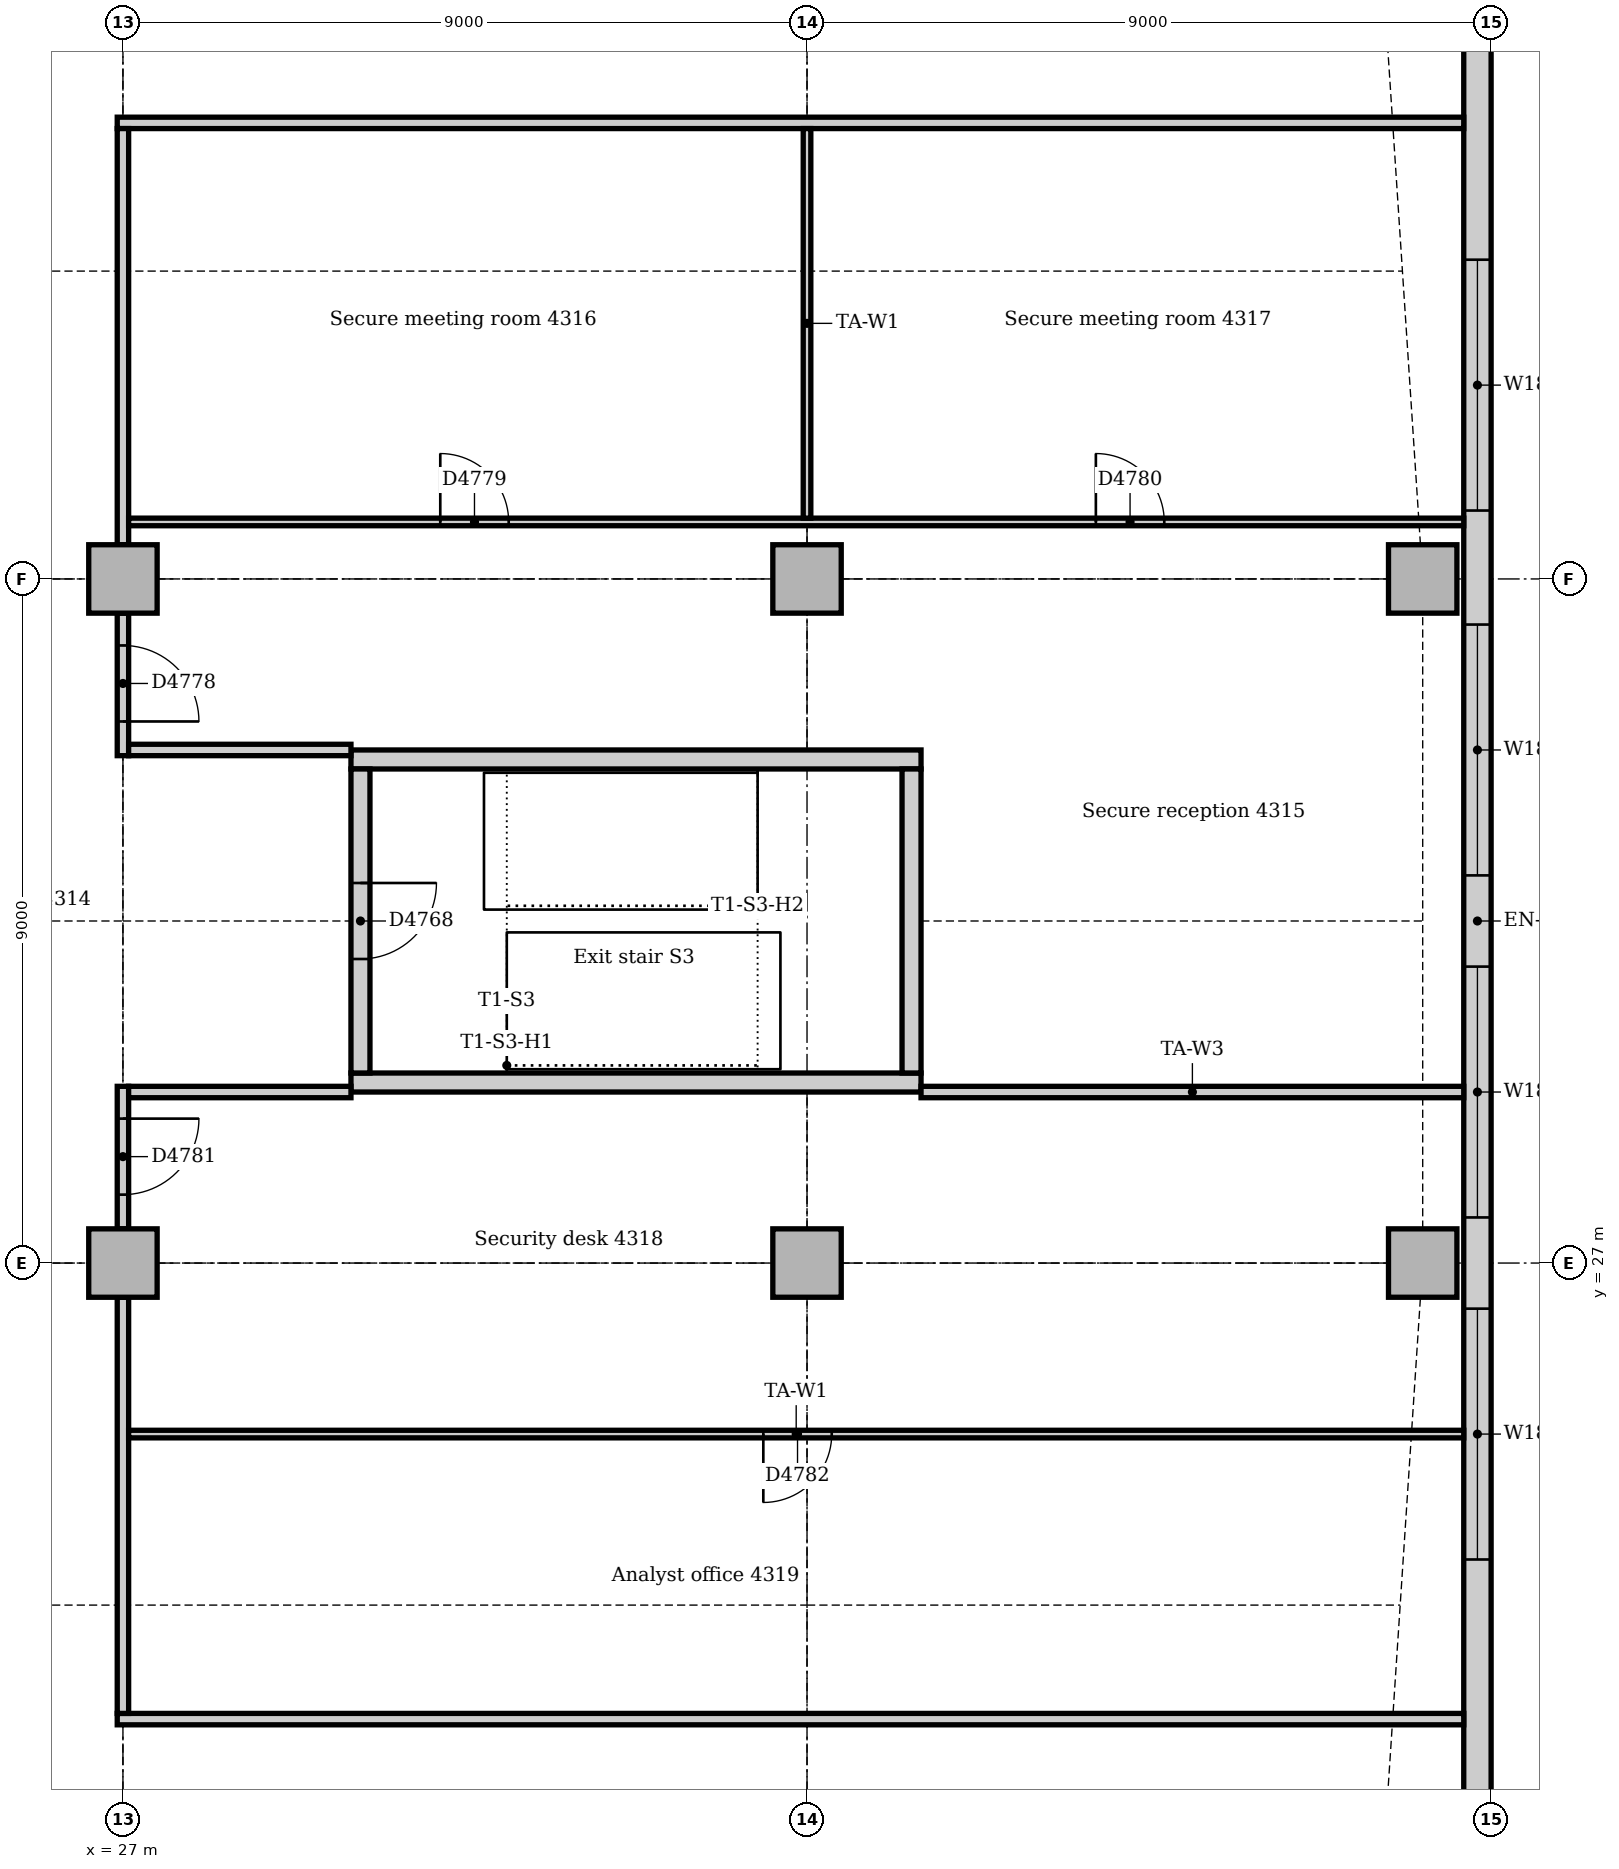
"""IFC4 building model, lengths in metres.
Left out: names, types, materials, properties, quantities, classifications, styles, units other than length and angle.
Written with IfcOpenShell. Run it as: python <this file> out.ifc"""

import sys

from ifc_helpers import new_model, si_unit, direction, frame, frame_2d, origin, origin_2d, place, context, subcontext, project, spatial, rectangle, extrude, element, fill, save


model = new_model("IFC4")
c1 = context("Model", 3, precision=1e-05, world=origin(), true_north=direction((0.0, 1.0)))
c2 = subcontext(c1, "Body", "Model", "MODEL_VIEW")
j1 = project(units=[si_unit("LENGTHUNIT", "METRE"), si_unit("PLANEANGLEUNIT", "RADIAN")], contexts=[c1])
p1 = place(None, origin())
s1 = spatial("IfcSite", under=j1, at=p1, CompositionType="ELEMENT")
p2 = place(p1, origin())
s2 = spatial("IfcBuilding", under=s1, at=p2, CompositionType="ELEMENT")
p3 = place(p2, frame((0.0, 0.0, 181.0)))
s3 = spatial("IfcBuildingStorey", under=s2, at=p3, CompositionType="ELEMENT", Elevation=181.0)
for number, where, z_axis, x_axis in (
    (1, (30.0, 29.375, 0.0), (0.0, 0.0, 1.0), (1.0, 0.0, 0.0)),
    (2, (37.5, 33.625, 0.0), (0.0, 0.0, 1.0), (-1.0, 0.0, 0.0)),
):
    element("IfcWall", number, at=place(p3, frame(where, z_axis=z_axis, x_axis=x_axis)), inside=s3, PredefinedType="SOLIDWALL", context=c2, shape_type="SweptSolid", body=[
        extrude(rectangle(XDim=7.5, YDim=0.25, at=frame_2d((3.75, 0.0))), origin(), (0.0, 0.0, 1.0), 4.0),
    ])
p4 = place(p3, frame((37.375, 29.5, 0.0), z_axis=(0.0, 0.0, 1.0), x_axis=(0.0, 1.0, 0.0)))
e3 = element("IfcWall", 3, at=p4, inside=s3, PredefinedType="SOLIDWALL", context=c2, shape_type="SweptSolid", body=[
    extrude(rectangle(XDim=4.0, YDim=0.25, at=frame_2d((2.0, 0.0))), origin(), (0.0, 0.0, 1.0), 4.0),
])
p5 = place(p3, frame((30.125, 33.5, 0.0), z_axis=(0.0, 0.0, 1.0), x_axis=(0.0, -1.0, 0.0)))
e4 = element("IfcWall", 4, at=p5, inside=s3, PredefinedType="SOLIDWALL", context=c2, shape_type="SweptSolid", body=[
    extrude(rectangle(XDim=4.0, YDim=0.25, at=frame_2d((2.0, 0.0))), origin(), (0.0, 0.0, 1.0), 4.0),
])
p6 = place(p5, frame((1.5, 0.0, 0.0)))
e5 = element("IfcOpeningElement", 5, at=p6, cuts=e4, PredefinedType="OPENING", context=c2, shape_type="SweptSolid", body=[
    extrude(rectangle(XDim=1.0, YDim=2.1, at=frame_2d((0.5, 1.05))), frame((0.0, 0.135, 0.0), z_axis=(0.0, -1.0, 0.0), x_axis=(1.0, 0.0, 0.0)), (0.0, 0.0, 1.0), 0.27),
])
for number, where, z_axis, x_axis in (
    (6, (44.1, 27.0, 0.0), (0.0, 0.0, 1.0), (1.0, 0.0, 0.0)),
    (7, (44.1, 36.0, 0.0), (0.0, 0.0, 1.0), (1.0, 0.0, 0.0)),
    (8, (27.0, 27.0, 0.0), (0.0, 0.0, 1.0), (1.0, 0.0, 0.0)),
    (9, (27.0, 36.0, 0.0), (0.0, 0.0, 1.0), (1.0, 0.0, 0.0)),
    (10, (36.0, 27.0, 0.0), (0.0, 0.0, 1.0), (1.0, 0.0, 0.0)),
    (11, (36.0, 36.0, 0.0), (0.0, 0.0, 1.0), (1.0, 0.0, 0.0)),
):
    element("IfcColumn", number, at=place(p3, frame(where, z_axis=z_axis, x_axis=x_axis)), inside=s3, PredefinedType="COLUMN", context=c2, shape_type="SweptSolid", body=[
        extrude(rectangle(XDim=0.9, YDim=0.9, at=origin_2d()), origin(), (0.0, 0.0, 1.0), 3.85),
    ])
p7 = place(p3, frame((44.82, 19.243, 0.0), z_axis=(0.0, 0.0, 1.0), x_axis=(0.0, 1.0, 0.0)))
e12 = element("IfcWall", 12, at=p7, inside=s3, PredefinedType="STANDARD", context=c2, shape_type="SweptSolid", body=[
    extrude(rectangle(XDim=24.515, YDim=0.36, at=frame_2d((12.257, 0.0))), origin(), (0.0, 0.0, 1.0), 3.85),
])
p8 = place(p7, frame((3.857, 0.0, 0.9)))
e13 = element("IfcOpeningElement", 13, at=p8, cuts=e12, PredefinedType="OPENING", context=c2, shape_type="SweptSolid", body=[
    extrude(rectangle(XDim=3.3, YDim=1.6, at=frame_2d((1.65, 0.8))), frame((0.0, 0.19, 0.0), z_axis=(0.0, -1.0, 0.0), x_axis=(1.0, 0.0, 0.0)), (0.0, 0.0, 1.0), 0.38),
])
p9 = place(p7, frame((8.357, 0.0, 0.9)))
e14 = element("IfcOpeningElement", 14, at=p9, cuts=e12, PredefinedType="OPENING", context=c2, shape_type="SweptSolid", body=[
    extrude(rectangle(XDim=3.3, YDim=1.6, at=frame_2d((1.65, 0.8))), frame((0.0, 0.19, 0.0), z_axis=(0.0, -1.0, 0.0), x_axis=(1.0, 0.0, 0.0)), (0.0, 0.0, 1.0), 0.38),
])
p10 = place(p7, frame((12.857, 0.0, 0.9)))
e15 = element("IfcOpeningElement", 15, at=p10, cuts=e12, PredefinedType="OPENING", context=c2, shape_type="SweptSolid", body=[
    extrude(rectangle(XDim=3.3, YDim=1.6, at=frame_2d((1.65, 0.8))), frame((0.0, 0.19, 0.0), z_axis=(0.0, -1.0, 0.0), x_axis=(1.0, 0.0, 0.0)), (0.0, 0.0, 1.0), 0.38),
])
p11 = place(p7, frame((17.657, 0.0, 0.9)))
e16 = element("IfcOpeningElement", 16, at=p11, cuts=e12, PredefinedType="OPENING", context=c2, shape_type="SweptSolid", body=[
    extrude(rectangle(XDim=3.3, YDim=1.6, at=frame_2d((1.65, 0.8))), frame((0.0, 0.19, 0.0), z_axis=(0.0, -1.0, 0.0), x_axis=(1.0, 0.0, 0.0)), (0.0, 0.0, 1.0), 0.38),
])
for number, where, z_axis, x_axis in (
    (17, (26.925, 21.0, 0.0), (0.0, 0.0, 1.0), (1.0, 0.0, 0.0)),
    (18, (26.925, 42.0, 0.0), (0.0, 0.0, 1.0), (1.0, 0.0, 0.0)),
):
    element("IfcWall", number, at=place(p3, frame(where, z_axis=z_axis, x_axis=x_axis)), inside=s3, PredefinedType="PARTITIONING", context=c2, shape_type="SweptSolid", body=[
        extrude(rectangle(XDim=17.715, YDim=0.15, at=frame_2d((8.857, 0.0))), origin(), (0.0, 0.0, 1.0), 3.85),
    ])
p12 = place(p3, frame((27.0, 21.075, 0.0), z_axis=(0.0, 0.0, 1.0), x_axis=(0.0, 1.0, 0.0)))
e19 = element("IfcWall", 19, at=p12, inside=s3, PredefinedType="PARTITIONING", context=c2, shape_type="SweptSolid", body=[
    extrude(rectangle(XDim=5.475, YDim=0.15, at=frame_2d((2.737, 0.0))), origin(), (0.0, 0.0, 1.0), 3.362),
])
p13 = place(p3, frame((27.0, 27.45, 0.0), z_axis=(0.0, 0.0, 1.0), x_axis=(0.0, 1.0, 0.0)))
e20 = element("IfcWall", 20, at=p13, inside=s3, PredefinedType="PARTITIONING", context=c2, shape_type="SweptSolid", body=[
    extrude(rectangle(XDim=1.875, YDim=0.15, at=frame_2d((0.938, 0.0))), origin(), (0.0, 0.0, 1.0), 3.362),
])
p14 = place(p13, frame((0.45, 0.0, 0.0)))
e21 = element("IfcOpeningElement", 21, at=p14, cuts=e20, PredefinedType="OPENING", context=c2, shape_type="SweptSolid", body=[
    extrude(rectangle(XDim=1.0, YDim=2.1, at=frame_2d((0.5, 1.05))), frame((0.0, 0.085, 0.0), z_axis=(0.0, -1.0, 0.0), x_axis=(1.0, 0.0, 0.0)), (0.0, 0.0, 1.0), 0.17),
])
p15 = place(p3, frame((27.0, 33.675, 0.0), z_axis=(0.0, 0.0, 1.0), x_axis=(0.0, 1.0, 0.0)))
e22 = element("IfcWall", 22, at=p15, inside=s3, PredefinedType="PARTITIONING", context=c2, shape_type="SweptSolid", body=[
    extrude(rectangle(XDim=1.875, YDim=0.15, at=frame_2d((0.938, 0.0))), origin(), (0.0, 0.0, 1.0), 3.362),
])
p16 = place(p15, frame((0.45, 0.0, 0.0)))
e23 = element("IfcOpeningElement", 23, at=p16, cuts=e22, PredefinedType="OPENING", context=c2, shape_type="SweptSolid", body=[
    extrude(rectangle(XDim=1.0, YDim=2.1, at=frame_2d((0.5, 1.05))), frame((0.0, 0.085, 0.0), z_axis=(0.0, -1.0, 0.0), x_axis=(1.0, 0.0, 0.0)), (0.0, 0.0, 1.0), 0.17),
])
p17 = place(p3, frame((27.0, 36.45, 0.0), z_axis=(0.0, 0.0, 1.0), x_axis=(0.0, 1.0, 0.0)))
e24 = element("IfcWall", 24, at=p17, inside=s3, PredefinedType="PARTITIONING", context=c2, shape_type="SweptSolid", body=[
    extrude(rectangle(XDim=5.475, YDim=0.15, at=frame_2d((2.737, 0.0))), origin(), (0.0, 0.0, 1.0), 3.362),
])
for number, where, z_axis, x_axis in (
    (25, (27.075, 29.25, 0.0), (0.0, 0.0, 1.0), (1.0, 0.0, 0.0)),
    (26, (27.075, 33.75, 0.0), (0.0, 0.0, 1.0), (1.0, 0.0, 0.0)),
):
    element("IfcWall", number, at=place(p3, frame(where, z_axis=z_axis, x_axis=x_axis)), inside=s3, PredefinedType="PARTITIONING", context=c2, shape_type="SweptSolid", body=[
        extrude(rectangle(XDim=2.925, YDim=0.15, at=frame_2d((1.462, 0.0))), origin(), (0.0, 0.0, 1.0), 3.85),
    ])
p18 = place(p3, frame((37.5, 29.25, 0.0), z_axis=(0.0, 0.0, 1.0), x_axis=(1.0, 0.0, 0.0)))
e27 = element("IfcWall", 27, at=p18, inside=s3, PredefinedType="PARTITIONING", context=c2, shape_type="SweptSolid", body=[
    extrude(rectangle(XDim=7.14, YDim=0.15, at=frame_2d((3.57, 0.0))), origin(), (0.0, 0.0, 1.0), 3.85),
])
p19 = place(p3, frame((27.075, 24.75, 0.0), z_axis=(0.0, 0.0, 1.0), x_axis=(1.0, 0.0, 0.0)))
e28 = element("IfcWall", 28, at=p19, inside=s3, PredefinedType="PARTITIONING", context=c2, shape_type="SweptSolid", body=[
    extrude(rectangle(XDim=17.565, YDim=0.1, at=frame_2d((8.783, 0.0))), origin(), (0.0, 0.0, 1.0), 3.85),
])
p20 = place(p19, frame((8.35, 0.0, 0.0)))
e29 = element("IfcOpeningElement", 29, at=p20, cuts=e28, PredefinedType="OPENING", context=c2, shape_type="SweptSolid", body=[
    extrude(rectangle(XDim=0.9, YDim=2.1, at=frame_2d((0.45, 1.05))), frame((0.0, 0.06, 0.0), z_axis=(0.0, -1.0, 0.0), x_axis=(1.0, 0.0, 0.0)), (0.0, 0.0, 1.0), 0.12),
])
p21 = place(p3, frame((27.075, 36.75, 0.0), z_axis=(0.0, 0.0, 1.0), x_axis=(1.0, 0.0, 0.0)))
e30 = element("IfcWall", 30, at=p21, inside=s3, PredefinedType="PARTITIONING", context=c2, shape_type="SweptSolid", body=[
    extrude(rectangle(XDim=17.565, YDim=0.1, at=frame_2d((8.783, 0.0))), origin(), (0.0, 0.0, 1.0), 3.85),
])
p22 = place(p21, frame((4.1, 0.0, 0.0)))
e31 = element("IfcOpeningElement", 31, at=p22, cuts=e30, PredefinedType="OPENING", context=c2, shape_type="SweptSolid", body=[
    extrude(rectangle(XDim=0.9, YDim=2.1, at=frame_2d((0.45, 1.05))), frame((0.0, 0.06, 0.0), z_axis=(0.0, -1.0, 0.0), x_axis=(1.0, 0.0, 0.0)), (0.0, 0.0, 1.0), 0.12),
])
p23 = place(p21, frame((12.725, 0.0, 0.0)))
e32 = element("IfcOpeningElement", 32, at=p23, cuts=e30, PredefinedType="OPENING", context=c2, shape_type="SweptSolid", body=[
    extrude(rectangle(XDim=0.9, YDim=2.1, at=frame_2d((0.45, 1.05))), frame((0.0, 0.06, 0.0), z_axis=(0.0, -1.0, 0.0), x_axis=(1.0, 0.0, 0.0)), (0.0, 0.0, 1.0), 0.12),
])
p24 = place(p3, frame((36.0, 36.8, 0.0), z_axis=(0.0, 0.0, 1.0), x_axis=(0.0, 1.0, 0.0)))
e33 = element("IfcWall", 33, at=p24, inside=s3, PredefinedType="PARTITIONING", context=c2, shape_type="SweptSolid", body=[
    extrude(rectangle(XDim=5.125, YDim=0.1, at=frame_2d((2.562, 0.0))), origin(), (0.0, 0.0, 1.0), 3.362),
])
p25 = place(p8, origin())
e34 = element("IfcWindow", 34, at=p25, inside=s3, PartitioningType="SINGLE_PANEL", PredefinedType="WINDOW", context=c2, shape_type="SweptSolid", body=[
    extrude(rectangle(XDim=3.3, YDim=1.6, at=frame_2d((1.65, 0.8))), frame((0.0, 0.13, 0.0), z_axis=(0.0, -1.0, 0.0), x_axis=(1.0, 0.0, 0.0)), (0.0, 0.0, 1.0), 0.06),
])
fill(e13, e34)
p26 = place(p9, origin())
e35 = element("IfcWindow", 35, at=p26, inside=s3, PartitioningType="SINGLE_PANEL", PredefinedType="WINDOW", context=c2, shape_type="SweptSolid", body=[
    extrude(rectangle(XDim=3.3, YDim=1.6, at=frame_2d((1.65, 0.8))), frame((0.0, 0.13, 0.0), z_axis=(0.0, -1.0, 0.0), x_axis=(1.0, 0.0, 0.0)), (0.0, 0.0, 1.0), 0.06),
])
fill(e14, e35)
p27 = place(p10, origin())
e36 = element("IfcWindow", 36, at=p27, inside=s3, PartitioningType="SINGLE_PANEL", PredefinedType="WINDOW", context=c2, shape_type="SweptSolid", body=[
    extrude(rectangle(XDim=3.3, YDim=1.6, at=frame_2d((1.65, 0.8))), frame((0.0, 0.13, 0.0), z_axis=(0.0, -1.0, 0.0), x_axis=(1.0, 0.0, 0.0)), (0.0, 0.0, 1.0), 0.06),
])
fill(e15, e36)
p28 = place(p11, origin())
e37 = element("IfcWindow", 37, at=p28, inside=s3, PartitioningType="SINGLE_PANEL", PredefinedType="WINDOW", context=c2, shape_type="SweptSolid", body=[
    extrude(rectangle(XDim=3.3, YDim=1.6, at=frame_2d((1.65, 0.8))), frame((0.0, 0.13, 0.0), z_axis=(0.0, -1.0, 0.0), x_axis=(1.0, 0.0, 0.0)), (0.0, 0.0, 1.0), 0.06),
])
fill(e16, e37)
p29 = place(p6, origin())
e38 = element("IfcDoor", 38, at=p29, inside=s3, OperationType="SINGLE_SWING_LEFT", PredefinedType="DOOR", context=c2, shape_type="SweptSolid", body=[
    extrude(rectangle(XDim=1.0, YDim=2.1, at=frame_2d((0.5, 1.05))), frame((0.0, 0.025, 0.0), z_axis=(0.0, -1.0, 0.0), x_axis=(1.0, 0.0, 0.0)), (0.0, 0.0, 1.0), 0.05),
])
fill(e5, e38)
p30 = place(p16, frame((1.0, 0.0, 0.0), z_axis=(0.0, 0.0, 1.0), x_axis=(-1.0, 0.0, 0.0)))
e39 = element("IfcDoor", 39, at=p30, inside=s3, OperationType="SINGLE_SWING_RIGHT", PredefinedType="DOOR", context=c2, shape_type="SweptSolid", body=[
    extrude(rectangle(XDim=1.0, YDim=2.1, at=frame_2d((0.5, 1.05))), frame((0.0, 0.025, 0.0), z_axis=(0.0, -1.0, 0.0), x_axis=(1.0, 0.0, 0.0)), (0.0, 0.0, 1.0), 0.05),
])
fill(e23, e39)
p31 = place(p22, origin())
e40 = element("IfcDoor", 40, at=p31, inside=s3, OperationType="SINGLE_SWING_LEFT", PredefinedType="DOOR", context=c2, shape_type="SweptSolid", body=[
    extrude(rectangle(XDim=0.9, YDim=2.1, at=frame_2d((0.45, 1.05))), frame((0.0, 0.025, 0.0), z_axis=(0.0, -1.0, 0.0), x_axis=(1.0, 0.0, 0.0)), (0.0, 0.0, 1.0), 0.05),
])
fill(e31, e40)
p32 = place(p23, origin())
e41 = element("IfcDoor", 41, at=p32, inside=s3, OperationType="SINGLE_SWING_LEFT", PredefinedType="DOOR", context=c2, shape_type="SweptSolid", body=[
    extrude(rectangle(XDim=0.9, YDim=2.1, at=frame_2d((0.45, 1.05))), frame((0.0, 0.025, 0.0), z_axis=(0.0, -1.0, 0.0), x_axis=(1.0, 0.0, 0.0)), (0.0, 0.0, 1.0), 0.05),
])
fill(e32, e41)
p33 = place(p14, frame((1.0, 0.0, 0.0), z_axis=(0.0, 0.0, 1.0), x_axis=(-1.0, 0.0, 0.0)))
e42 = element("IfcDoor", 42, at=p33, inside=s3, OperationType="SINGLE_SWING_LEFT", PredefinedType="DOOR", context=c2, shape_type="SweptSolid", body=[
    extrude(rectangle(XDim=1.0, YDim=2.1, at=frame_2d((0.5, 1.05))), frame((0.0, 0.025, 0.0), z_axis=(0.0, -1.0, 0.0), x_axis=(1.0, 0.0, 0.0)), (0.0, 0.0, 1.0), 0.05),
])
fill(e21, e42)
p34 = place(p20, frame((0.9, 0.0, 0.0), z_axis=(0.0, 0.0, 1.0), x_axis=(-1.0, 0.0, 0.0)))
e43 = element("IfcDoor", 43, at=p34, inside=s3, OperationType="SINGLE_SWING_RIGHT", PredefinedType="DOOR", context=c2, shape_type="SweptSolid", body=[
    extrude(rectangle(XDim=0.9, YDim=2.1, at=frame_2d((0.45, 1.05))), frame((0.0, 0.025, 0.0), z_axis=(0.0, -1.0, 0.0), x_axis=(1.0, 0.0, 0.0)), (0.0, 0.0, 1.0), 0.05),
])
fill(e29, e43)
save(model, sys.argv[1])
